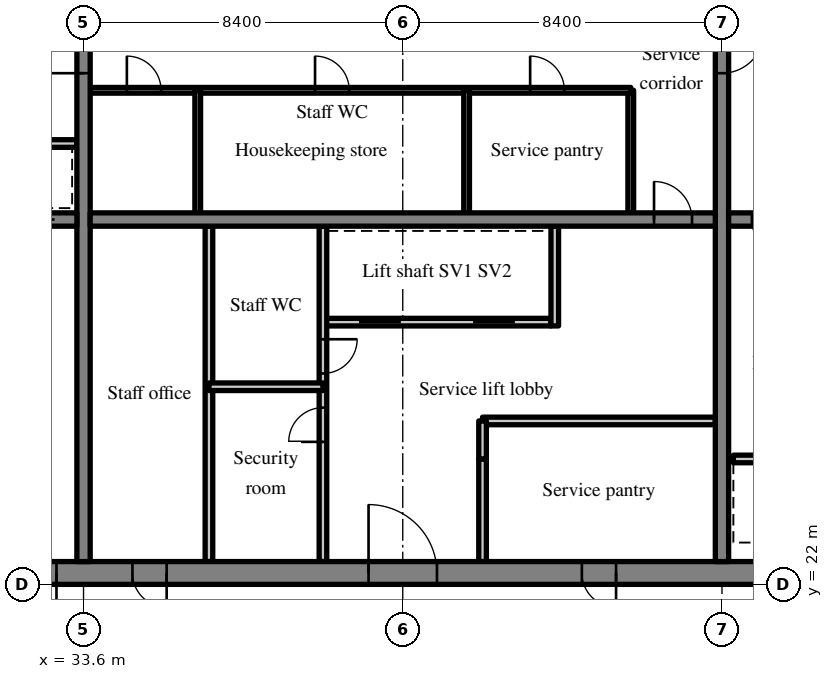
"""IFC4 building model, lengths in metres.
Left out: names, types, materials, properties, quantities, classifications, styles, units other than length and angle.
Written with IfcOpenShell. Run it as: python <this file> out.ifc"""

import sys

from ifc_helpers import new_model, si_unit, direction, frame, frame_2d, origin, place, context, subcontext, project, spatial, rectangle, extrude, source, transform, mapped, element, fill, save


model = new_model("IFC4")
c1 = context("Model", 3, precision=1e-05, world=origin(), true_north=direction((0.0, 1.0)))
c2 = subcontext(c1, "Body", "Model", "MODEL_VIEW")
j1 = project(units=[si_unit("LENGTHUNIT", "METRE"), si_unit("PLANEANGLEUNIT", "RADIAN")], contexts=[c1])
p1 = place(None, origin())
s1 = spatial("IfcSite", under=j1, at=p1, CompositionType="ELEMENT")
p2 = place(p1, origin())
s2 = spatial("IfcBuilding", under=s1, at=p2, CompositionType="ELEMENT")
p3 = place(p2, frame((0.0, 0.0, 241.3)))
s3 = spatial("IfcBuildingStorey", under=s2, at=p3, CompositionType="ELEMENT", Elevation=241.3)
m1 = source(origin(), c2, "Body", "SweptSolid", [
    extrude(rectangle(XDim=50.4, YDim=0.6, at=frame_2d((25.2, 0.0))), origin(), (0.0, 0.0, 1.0), 3.62),
])
p4 = place(p3, frame((25.2, 22.3, 0.0), z_axis=(0.0, 0.0, 1.0), x_axis=(1.0, 0.0, 0.0)))
e1 = element("IfcWall", 1, at=p4, inside=s3, PredefinedType="SHEAR", context=c2, shape_type="MappedRepresentation", body=[
    mapped(m1, transform((0.0, 0.0, 0.0), scale=1.0)),
])
m2 = source(origin(), c2, "Body", "SweptSolid", [
    extrude(rectangle(XDim=1.8, YDim=2.1, at=frame_2d((0.9, 1.05))), frame((0.0, 0.31, 0.0), z_axis=(0.0, -1.0, 0.0), x_axis=(1.0, 0.0, 0.0)), (0.0, 0.0, 1.0), 0.62),
])
p5 = place(p4, frame((15.9, 0.0, 0.0)))
e2 = element("IfcOpeningElement", 2, at=p5, cuts=e1, PredefinedType="OPENING", context=c2, shape_type="MappedRepresentation", body=[
    mapped(m2, transform((0.0, 0.0, 0.0), scale=1.0)),
])
m3 = source(origin(), c2, "Body", "SweptSolid", [
    extrude(rectangle(XDim=0.9, YDim=2.1, at=frame_2d((0.45, 1.05))), frame((0.0, 0.31, 0.0), z_axis=(0.0, -1.0, 0.0), x_axis=(1.0, 0.0, 0.0)), (0.0, 0.0, 1.0), 0.62),
])
p6 = place(p4, frame((9.687, 0.0, 0.0)))
e3 = element("IfcOpeningElement", 3, at=p6, cuts=e1, PredefinedType="OPENING", context=c2, shape_type="MappedRepresentation", body=[
    mapped(m3, transform((0.0, 0.0, 0.0), scale=1.0)),
])
p7 = place(p4, frame((21.513, 0.0, 0.0)))
e4 = element("IfcOpeningElement", 4, at=p7, cuts=e1, PredefinedType="OPENING", context=c2, shape_type="MappedRepresentation", body=[
    mapped(m3, transform((0.0, 0.0, 0.0), scale=1.0)),
])
p8 = place(p4, frame((32.7, 0.0, 0.0)))
e5 = element("IfcOpeningElement", 5, at=p8, cuts=e1, PredefinedType="OPENING", context=c2, shape_type="MappedRepresentation", body=[
    mapped(m2, transform((0.0, 0.0, 0.0), scale=1.0)),
])
m4 = source(origin(), c2, "Body", "SweptSolid", [
    extrude(rectangle(XDim=1.2, YDim=2.1, at=frame_2d((0.6, 1.05))), frame((0.0, 0.31, 0.0), z_axis=(0.0, -1.0, 0.0), x_axis=(1.0, 0.0, 0.0)), (0.0, 0.0, 1.0), 0.62),
])
p9 = place(p4, frame((6.488, 0.0, 0.0)))
e6 = element("IfcOpeningElement", 6, at=p9, cuts=e1, PredefinedType="OPENING", context=c2, shape_type="MappedRepresentation", body=[
    mapped(m4, transform((0.0, 0.0, 0.0), scale=1.0)),
])
p10 = place(p4, frame((47.925, 0.0, 0.0)))
e7 = element("IfcOpeningElement", 7, at=p10, cuts=e1, PredefinedType="OPENING", context=c2, shape_type="MappedRepresentation", body=[
    mapped(m4, transform((0.0, 0.0, 0.0), scale=1.0)),
])
m5 = source(origin(), c2, "Body", "SweptSolid", [
    extrude(rectangle(XDim=18.8, YDim=0.35, at=frame_2d((9.4, 0.0))), origin(), (0.0, 0.0, 1.0), 3.62),
])
p11 = place(p3, frame((33.6, 22.6, 0.0), z_axis=(0.0, 0.0, 1.0), x_axis=(0.0, 1.0, 0.0)))
e8 = element("IfcWall", 8, at=p11, inside=s3, PredefinedType="SHEAR", context=c2, shape_type="MappedRepresentation", body=[
    mapped(m5, transform((0.0, 0.0, 0.0), scale=1.0)),
])
m6 = source(origin(), c2, "Body", "SweptSolid", [
    extrude(rectangle(XDim=1.1, YDim=2.1, at=frame_2d((0.55, 1.05))), frame((0.0, 0.185, 0.0), z_axis=(0.0, -1.0, 0.0), x_axis=(1.0, 0.0, 0.0)), (0.0, 0.0, 1.0), 0.37),
])
p12 = place(p11, frame((12.85, 0.0, 0.0)))
e9 = element("IfcOpeningElement", 9, at=p12, cuts=e8, PredefinedType="OPENING", context=c2, shape_type="MappedRepresentation", body=[
    mapped(m6, transform((0.0, 0.0, 0.0), scale=1.0)),
])
p13 = place(p3, frame((50.4, 22.6, 0.0), z_axis=(0.0, 0.0, 1.0), x_axis=(0.0, 1.0, 0.0)))
e10 = element("IfcWall", 10, at=p13, inside=s3, PredefinedType="SHEAR", context=c2, shape_type="MappedRepresentation", body=[
    mapped(m5, transform((0.0, 0.0, 0.0), scale=1.0)),
])
p14 = place(p13, frame((12.85, 0.0, 0.0)))
e11 = element("IfcOpeningElement", 11, at=p14, cuts=e10, PredefinedType="OPENING", context=c2, shape_type="MappedRepresentation", body=[
    mapped(m6, transform((0.0, 0.0, 0.0), scale=1.0)),
])
m7 = source(origin(), c2, "Body", "SweptSolid", [
    extrude(rectangle(XDim=7.625, YDim=0.35, at=frame_2d((3.812, 0.0))), origin(), (0.0, 0.0, 1.0), 3.62),
])
p15 = place(p3, frame((25.8, 31.6, 0.0), z_axis=(0.0, 0.0, 1.0), x_axis=(1.0, 0.0, 0.0)))
e12 = element("IfcWall", 12, at=p15, inside=s3, PredefinedType="SHEAR", context=c2, shape_type="MappedRepresentation", body=[
    mapped(m7, transform((0.0, 0.0, 0.0), scale=1.0)),
])
p16 = place(p15, frame((5.938, 0.0, 0.0)))
e13 = element("IfcOpeningElement", 13, at=p16, cuts=e12, PredefinedType="OPENING", context=c2, shape_type="MappedRepresentation", body=[
    mapped(m6, transform((0.0, 0.0, 0.0), scale=1.0)),
])
m8 = source(origin(), c2, "Body", "SweptSolid", [
    extrude(rectangle(XDim=16.45, YDim=0.35, at=frame_2d((8.225, 0.0))), origin(), (0.0, 0.0, 1.0), 3.62),
])
p17 = place(p3, frame((33.775, 31.6, 0.0), z_axis=(0.0, 0.0, 1.0), x_axis=(1.0, 0.0, 0.0)))
e14 = element("IfcWall", 14, at=p17, inside=s3, PredefinedType="SHEAR", context=c2, shape_type="MappedRepresentation", body=[
    mapped(m8, transform((0.0, 0.0, 0.0), scale=1.0)),
])
m9 = source(origin(), c2, "Body", "SweptSolid", [
    extrude(rectangle(XDim=1.0, YDim=2.1, at=frame_2d((0.5, 1.05))), frame((0.0, 0.185, 0.0), z_axis=(0.0, -1.0, 0.0), x_axis=(1.0, 0.0, 0.0)), (0.0, 0.0, 1.0), 0.37),
])
p18 = place(p17, frame((14.837, 0.0, 0.0)))
e15 = element("IfcOpeningElement", 15, at=p18, cuts=e14, PredefinedType="OPENING", context=c2, shape_type="MappedRepresentation", body=[
    mapped(m9, transform((0.0, 0.0, 0.0), scale=1.0)),
])
m10 = source(origin(), c2, "Body", "SweptSolid", [
    extrude(rectangle(XDim=16.45, YDim=0.35, at=frame_2d((8.225, 0.0))), origin(), (0.0, 0.0, 1.0), 3.62),
])
p19 = place(p3, frame((50.575, 31.6, 0.0), z_axis=(0.0, 0.0, 1.0), x_axis=(1.0, 0.0, 0.0)))
e16 = element("IfcWall", 16, at=p19, inside=s3, PredefinedType="SHEAR", context=c2, shape_type="MappedRepresentation", body=[
    mapped(m10, transform((0.0, 0.0, 0.0), scale=1.0)),
])
p20 = place(p19, frame((0.613, 0.0, 0.0)))
e17 = element("IfcOpeningElement", 17, at=p20, cuts=e16, PredefinedType="OPENING", context=c2, shape_type="MappedRepresentation", body=[
    mapped(m9, transform((0.0, 0.0, 0.0), scale=1.0)),
])
m11 = source(origin(), c2, "Body", "SweptSolid", [
    extrude(rectangle(XDim=6.0, YDim=0.2, at=frame_2d((3.0, 0.0))), origin(), (0.0, 0.0, 1.0), 3.62),
])
p21 = place(p3, frame((39.9, 28.9, 0.0), z_axis=(0.0, 0.0, 1.0), x_axis=(1.0, 0.0, 0.0)))
e18 = element("IfcWall", 18, at=p21, inside=s3, PredefinedType="SOLIDWALL", context=c2, shape_type="MappedRepresentation", body=[
    mapped(m11, transform((0.0, 0.0, 0.0), scale=1.0)),
])
m12 = source(origin(), c2, "Body", "SweptSolid", [
    extrude(rectangle(XDim=1.1, YDim=2.1, at=frame_2d((0.55, 1.05))), frame((0.0, 0.11, 0.0), z_axis=(0.0, -1.0, 0.0), x_axis=(1.0, 0.0, 0.0)), (0.0, 0.0, 1.0), 0.22),
])
p22 = place(p21, frame((0.95, 0.0, 0.0)))
e19 = element("IfcOpeningElement", 19, at=p22, cuts=e18, PredefinedType="OPENING", context=c2, shape_type="MappedRepresentation", body=[
    mapped(m12, transform((0.0, 0.0, 0.0), scale=1.0)),
])
p23 = place(p21, frame((3.95, 0.0, 0.0)))
e20 = element("IfcOpeningElement", 20, at=p23, cuts=e18, PredefinedType="OPENING", context=c2, shape_type="MappedRepresentation", body=[
    mapped(m12, transform((0.0, 0.0, 0.0), scale=1.0)),
])
m13 = source(origin(), c2, "Body", "SweptSolid", [
    extrude(rectangle(XDim=8.825, YDim=0.2, at=frame_2d((4.413, 0.0))), origin(), (0.0, 0.0, 1.0), 3.62),
])
p24 = place(p3, frame((39.9, 22.6, 0.0), z_axis=(0.0, 0.0, 1.0), x_axis=(0.0, 1.0, 0.0)))
e21 = element("IfcWall", 21, at=p24, inside=s3, PredefinedType="PARTITIONING", context=c2, shape_type="MappedRepresentation", body=[
    mapped(m13, transform((0.0, 0.0, 0.0), scale=1.0)),
])
m14 = source(origin(), c2, "Body", "SweptSolid", [
    extrude(rectangle(XDim=0.9, YDim=2.1, at=frame_2d((0.45, 1.05))), frame((0.0, 0.11, 0.0), z_axis=(0.0, -1.0, 0.0), x_axis=(1.0, 0.0, 0.0)), (0.0, 0.0, 1.0), 0.22),
])
p25 = place(p24, frame((3.15, 0.0, 0.0)))
e22 = element("IfcOpeningElement", 22, at=p25, cuts=e21, PredefinedType="OPENING", context=c2, shape_type="MappedRepresentation", body=[
    mapped(m14, transform((0.0, 0.0, 0.0), scale=1.0)),
])
p26 = place(p24, frame((4.95, 0.0, 0.0)))
e23 = element("IfcOpeningElement", 23, at=p26, cuts=e21, PredefinedType="OPENING", context=c2, shape_type="MappedRepresentation", body=[
    mapped(m14, transform((0.0, 0.0, 0.0), scale=1.0)),
])
m15 = source(origin(), c2, "Body", "SweptSolid", [
    extrude(rectangle(XDim=2.7, YDim=0.2, at=frame_2d((1.35, 0.0))), origin(), (0.0, 0.0, 1.0), 3.62),
])
p27 = place(p3, frame((44.1, 22.6, 0.0), z_axis=(0.0, 0.0, 1.0), x_axis=(0.0, 1.0, 0.0)))
e24 = element("IfcWall", 24, at=p27, inside=s3, PredefinedType="PARTITIONING", context=c2, shape_type="MappedRepresentation", body=[
    mapped(m15, transform((0.0, 0.0, 0.0), scale=1.0)),
])
m16 = source(origin(), c2, "Body", "SweptSolid", [
    extrude(rectangle(XDim=2.625, YDim=0.2, at=frame_2d((1.312, 0.0))), origin(), (0.0, 0.0, 1.0), 3.62),
])
p28 = place(p3, frame((46.0, 28.8, 0.0), z_axis=(0.0, 0.0, 1.0), x_axis=(0.0, 1.0, 0.0)))
e25 = element("IfcWall", 25, at=p28, inside=s3, PredefinedType="SOLIDWALL", context=c2, shape_type="MappedRepresentation", body=[
    mapped(m16, transform((0.0, 0.0, 0.0), scale=1.0)),
])
p29 = place(p3, frame((36.9, 22.6, 0.0), z_axis=(0.0, 0.0, 1.0), x_axis=(0.0, 1.0, 0.0)))
e26 = element("IfcWall", 26, at=p29, inside=s3, PredefinedType="PARTITIONING", context=c2, shape_type="MappedRepresentation", body=[
    mapped(m13, transform((0.0, 0.0, 0.0), scale=1.0)),
])
m17 = source(origin(), c2, "Body", "SweptSolid", [
    extrude(rectangle(XDim=3.0, YDim=0.2, at=frame_2d((1.5, 0.0))), origin(), (0.0, 0.0, 1.0), 3.62),
])
p30 = place(p3, frame((36.9, 27.2, 0.0), z_axis=(0.0, 0.0, 1.0), x_axis=(1.0, 0.0, 0.0)))
e27 = element("IfcWall", 27, at=p30, inside=s3, PredefinedType="PARTITIONING", context=c2, shape_type="MappedRepresentation", body=[
    mapped(m17, transform((0.0, 0.0, 0.0), scale=1.0)),
])
m18 = source(origin(), c2, "Body", "SweptSolid", [
    extrude(rectangle(XDim=6.125, YDim=0.2, at=frame_2d((3.062, 0.0))), origin(), (0.0, 0.0, 1.0), 3.62),
])
p31 = place(p3, frame((44.1, 26.3, 0.0), z_axis=(0.0, 0.0, 1.0), x_axis=(1.0, 0.0, 0.0)))
e28 = element("IfcWall", 28, at=p31, inside=s3, PredefinedType="PARTITIONING", context=c2, shape_type="MappedRepresentation", body=[
    mapped(m18, transform((0.0, 0.0, 0.0), scale=1.0)),
])
m19 = source(origin(), c2, "Body", "SweptSolid", [
    extrude(rectangle(XDim=1.0, YDim=0.2, at=frame_2d((0.5, 0.0))), origin(), (0.0, 0.0, 1.0), 3.62),
])
p32 = place(p3, frame((44.1, 25.3, 0.0), z_axis=(0.0, 0.0, 1.0), x_axis=(0.0, 1.0, 0.0)))
e29 = element("IfcWall", 29, at=p32, inside=s3, PredefinedType="PARTITIONING", context=c2, shape_type="MappedRepresentation", body=[
    mapped(m19, transform((0.0, 0.0, 0.0), scale=1.0)),
])
m20 = source(origin(), c2, "Body", "SweptSolid", [
    extrude(rectangle(XDim=3.225, YDim=0.15, at=frame_2d((1.613, 0.0))), origin(), (0.0, 0.0, 1.0), 3.62),
])
p33 = place(p3, frame((48.0, 31.775, 0.0), z_axis=(0.0, 0.0, 1.0), x_axis=(0.0, 1.0, 0.0)))
e30 = element("IfcWall", 30, at=p33, inside=s3, PredefinedType="PARTITIONING", context=c2, shape_type="MappedRepresentation", body=[
    mapped(m20, transform((0.0, 0.0, 0.0), scale=1.0)),
])
m21 = source(origin(), c2, "Body", "SweptSolid", [
    extrude(rectangle(XDim=14.225, YDim=0.15, at=frame_2d((7.113, 0.0))), origin(), (0.0, 0.0, 1.0), 3.62),
])
p34 = place(p3, frame((33.775, 35.0, 0.0), z_axis=(0.0, 0.0, 1.0), x_axis=(1.0, 0.0, 0.0)))
e31 = element("IfcWall", 31, at=p34, inside=s3, PredefinedType="PARTITIONING", context=c2, shape_type="MappedRepresentation", body=[
    mapped(m21, transform((0.0, 0.0, 0.0), scale=1.0)),
])
m22 = source(origin(), c2, "Body", "SweptSolid", [
    extrude(rectangle(XDim=0.9, YDim=2.1, at=frame_2d((0.45, 1.05))), frame((0.0, 0.085, 0.0), z_axis=(0.0, -1.0, 0.0), x_axis=(1.0, 0.0, 0.0)), (0.0, 0.0, 1.0), 0.17),
])
p35 = place(p34, frame((0.965, 0.0, 0.0)))
e32 = element("IfcOpeningElement", 32, at=p35, cuts=e31, PredefinedType="OPENING", context=c2, shape_type="MappedRepresentation", body=[
    mapped(m22, transform((0.0, 0.0, 0.0), scale=1.0)),
])
p36 = place(p34, frame((5.917, 0.0, 0.0)))
e33 = element("IfcOpeningElement", 33, at=p36, cuts=e31, PredefinedType="OPENING", context=c2, shape_type="MappedRepresentation", body=[
    mapped(m22, transform((0.0, 0.0, 0.0), scale=1.0)),
])
p37 = place(p34, frame((11.577, 0.0, 0.0)))
e34 = element("IfcOpeningElement", 34, at=p37, cuts=e31, PredefinedType="OPENING", context=c2, shape_type="MappedRepresentation", body=[
    mapped(m22, transform((0.0, 0.0, 0.0), scale=1.0)),
])
for number, where, z_axis, x_axis in (
    (35, (36.605, 31.775, 0.0), (0.0, 0.0, 1.0), (0.0, 1.0, 0.0)),
    (36, (43.68, 31.775, 0.0), (0.0, 0.0, 1.0), (0.0, 1.0, 0.0)),
):
    element("IfcWall", number, at=place(p3, frame(where, z_axis=z_axis, x_axis=x_axis)), inside=s3, PredefinedType="PARTITIONING", context=c2, shape_type="MappedRepresentation", body=[
        mapped(m20, transform((0.0, 0.0, 0.0), scale=1.0)),
    ])
p38 = place(p3, frame((56.7, 25.3, 0.0), z_axis=(0.0, 0.0, 1.0), x_axis=(-1.0, 0.0, 0.0)))
e37 = element("IfcWall", 37, at=p38, inside=s3, PredefinedType="SOLIDWALL", context=c2, shape_type="MappedRepresentation", body=[
    mapped(m11, transform((0.0, 0.0, 0.0), scale=1.0)),
])
p39 = place(p38, frame((0.95, 0.0, 0.0)))
e38 = element("IfcOpeningElement", 38, at=p39, cuts=e37, PredefinedType="OPENING", context=c2, shape_type="MappedRepresentation", body=[
    mapped(m12, transform((0.0, 0.0, 0.0), scale=1.0)),
])
p40 = place(p38, frame((3.95, 0.0, 0.0)))
e39 = element("IfcOpeningElement", 39, at=p40, cuts=e37, PredefinedType="OPENING", context=c2, shape_type="MappedRepresentation", body=[
    mapped(m12, transform((0.0, 0.0, 0.0), scale=1.0)),
])
m23 = source(origin(), c2, "Body", "SweptSolid", [
    extrude(rectangle(XDim=2.275, YDim=0.2, at=frame_2d((1.138, 0.0))), origin(), (0.0, 0.0, 1.0), 3.62),
])
p41 = place(p3, frame((31.15, 33.6, 0.0), z_axis=(0.0, 0.0, 1.0), x_axis=(1.0, 0.0, 0.0)))
e40 = element("IfcWall", 40, at=p41, inside=s3, PredefinedType="SOLIDWALL", context=c2, shape_type="MappedRepresentation", body=[
    mapped(m23, transform((0.0, 0.0, 0.0), scale=1.0)),
])
m24 = source(origin(), c2, "Body", "SweptSolid", [
    extrude(rectangle(XDim=1.8, YDim=2.1, at=frame_2d((0.9, 1.05))), frame((0.0, 0.225, 0.0), z_axis=(0.0, -1.0, 0.0), x_axis=(1.0, 0.0, 0.0)), (0.0, 0.0, 1.0), 0.05),
])
p42 = place(p5, origin())
e41 = element("IfcDoor", 41, at=p42, inside=s3, OperationType="DOUBLE_DOOR_SINGLE_SWING", PredefinedType="DOOR", context=c2, shape_type="MappedRepresentation", body=[
    mapped(m24, transform((0.0, 0.0, 0.0), scale=1.0)),
])
fill(e2, e41)
m25 = source(origin(), c2, "Body", "SweptSolid", [
    extrude(rectangle(XDim=1.0, YDim=2.1, at=frame_2d((0.5, 1.05))), frame((0.0, 0.025, 0.0), z_axis=(0.0, -1.0, 0.0), x_axis=(1.0, 0.0, 0.0)), (0.0, 0.0, 1.0), 0.05),
])
p43 = place(p18, origin())
e42 = element("IfcDoor", 42, at=p43, inside=s3, OperationType="SINGLE_SWING_LEFT", PredefinedType="DOOR", context=c2, shape_type="MappedRepresentation", body=[
    mapped(m25, transform((0.0, 0.0, 0.0), scale=1.0)),
])
fill(e15, e42)
m26 = source(origin(), c2, "Body", "SweptSolid", [
    extrude(rectangle(XDim=1.1, YDim=2.1, at=frame_2d((0.55, 1.05))), frame((0.0, 0.025, 0.0), z_axis=(0.0, -1.0, 0.0), x_axis=(1.0, 0.0, 0.0)), (0.0, 0.0, 1.0), 0.05),
])
p44 = place(p22, origin())
e43 = element("IfcDoor", 43, at=p44, inside=s3, OperationType="SLIDING_TO_LEFT", PredefinedType="DOOR", context=c2, shape_type="MappedRepresentation", body=[
    mapped(m26, transform((0.0, 0.0, 0.0), scale=1.0)),
])
fill(e19, e43)
p45 = place(p23, origin())
e44 = element("IfcDoor", 44, at=p45, inside=s3, OperationType="SLIDING_TO_RIGHT", PredefinedType="DOOR", context=c2, shape_type="MappedRepresentation", body=[
    mapped(m26, transform((0.0, 0.0, 0.0), scale=1.0)),
])
fill(e20, e44)
m27 = source(origin(), c2, "Body", "SweptSolid", [
    extrude(rectangle(XDim=0.9, YDim=2.1, at=frame_2d((0.45, 1.05))), frame((0.0, 0.225, 0.0), z_axis=(0.0, -1.0, 0.0), x_axis=(1.0, 0.0, 0.0)), (0.0, 0.0, 1.0), 0.05),
])
p46 = place(p6, origin())
e45 = element("IfcDoor", 45, at=p46, inside=s3, OperationType="SINGLE_SWING_RIGHT", PredefinedType="DOOR", context=c2, shape_type="MappedRepresentation", body=[
    mapped(m27, transform((0.0, 0.0, 0.0), scale=1.0)),
])
fill(e3, e45)
m28 = source(origin(), c2, "Body", "SweptSolid", [
    extrude(rectangle(XDim=0.9, YDim=2.1, at=frame_2d((0.45, 1.05))), frame((0.0, 0.025, 0.0), z_axis=(0.0, -1.0, 0.0), x_axis=(1.0, 0.0, 0.0)), (0.0, 0.0, 1.0), 0.05),
])
p47 = place(p25, origin())
e46 = element("IfcDoor", 46, at=p47, inside=s3, OperationType="SINGLE_SWING_LEFT", PredefinedType="DOOR", context=c2, shape_type="MappedRepresentation", body=[
    mapped(m28, transform((0.0, 0.0, 0.0), scale=1.0)),
])
fill(e22, e46)
p48 = place(p26, origin())
e47 = element("IfcDoor", 47, at=p48, inside=s3, OperationType="SINGLE_SWING_RIGHT", PredefinedType="DOOR", context=c2, shape_type="MappedRepresentation", body=[
    mapped(m28, transform((0.0, 0.0, 0.0), scale=1.0)),
])
fill(e23, e47)
p49 = place(p7, origin())
e48 = element("IfcDoor", 48, at=p49, inside=s3, OperationType="SINGLE_SWING_RIGHT", PredefinedType="DOOR", context=c2, shape_type="MappedRepresentation", body=[
    mapped(m27, transform((0.0, 0.0, 0.0), scale=1.0)),
])
fill(e4, e48)
p50 = place(p35, origin())
e49 = element("IfcDoor", 49, at=p50, inside=s3, OperationType="SINGLE_SWING_LEFT", PredefinedType="DOOR", context=c2, shape_type="MappedRepresentation", body=[
    mapped(m28, transform((0.0, 0.0, 0.0), scale=1.0)),
])
fill(e32, e49)
p51 = place(p36, origin())
e50 = element("IfcDoor", 50, at=p51, inside=s3, OperationType="SINGLE_SWING_LEFT", PredefinedType="DOOR", context=c2, shape_type="MappedRepresentation", body=[
    mapped(m28, transform((0.0, 0.0, 0.0), scale=1.0)),
])
fill(e33, e50)
p52 = place(p37, origin())
e51 = element("IfcDoor", 51, at=p52, inside=s3, OperationType="SINGLE_SWING_LEFT", PredefinedType="DOOR", context=c2, shape_type="MappedRepresentation", body=[
    mapped(m28, transform((0.0, 0.0, 0.0), scale=1.0)),
])
fill(e34, e51)
p53 = place(p20, origin())
e52 = element("IfcDoor", 52, at=p53, inside=s3, OperationType="SINGLE_SWING_RIGHT", PredefinedType="DOOR", context=c2, shape_type="MappedRepresentation", body=[
    mapped(m25, transform((0.0, 0.0, 0.0), scale=1.0)),
])
fill(e17, e52)
m29 = source(origin(), c2, "Body", "SweptSolid", [
    extrude(rectangle(XDim=1.2, YDim=2.1, at=frame_2d((0.6, 1.05))), frame((0.0, 0.225, 0.0), z_axis=(0.0, -1.0, 0.0), x_axis=(1.0, 0.0, 0.0)), (0.0, 0.0, 1.0), 0.05),
])
p54 = place(p9, origin())
e53 = element("IfcDoor", 53, at=p54, inside=s3, OperationType="SINGLE_SWING_RIGHT", PredefinedType="DOOR", context=c2, shape_type="MappedRepresentation", body=[
    mapped(m29, transform((0.0, 0.0, 0.0), scale=1.0)),
])
fill(e6, e53)
p55 = place(p16, origin())
e54 = element("IfcDoor", 54, at=p55, inside=s3, OperationType="SLIDING_TO_RIGHT", PredefinedType="DOOR", context=c2, shape_type="MappedRepresentation", body=[
    mapped(m26, transform((0.0, 0.0, 0.0), scale=1.0)),
])
fill(e13, e54)
p56 = place(p12, origin())
e55 = element("IfcDoor", 55, at=p56, inside=s3, OperationType="SINGLE_SWING_LEFT", PredefinedType="DOOR", context=c2, shape_type="MappedRepresentation", body=[
    mapped(m26, transform((0.0, 0.0, 0.0), scale=1.0)),
])
fill(e9, e55)
p57 = place(p14, origin())
e56 = element("IfcDoor", 56, at=p57, inside=s3, OperationType="SINGLE_SWING_RIGHT", PredefinedType="DOOR", context=c2, shape_type="MappedRepresentation", body=[
    mapped(m26, transform((0.0, 0.0, 0.0), scale=1.0)),
])
fill(e11, e56)
save(model, sys.argv[1])
